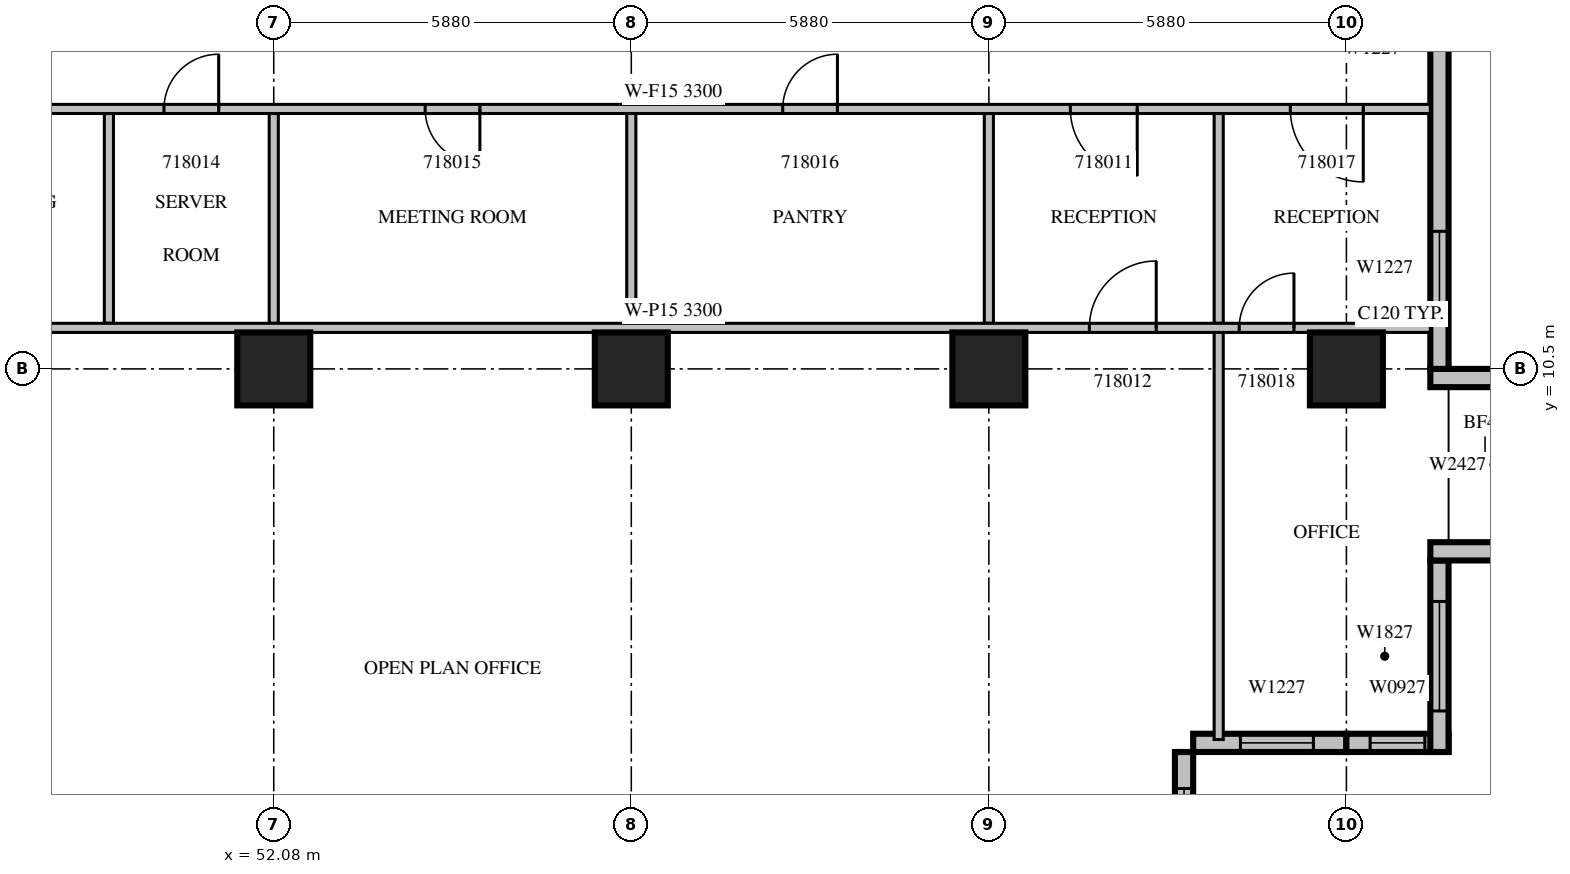
"""IFC4 building model, lengths in metres.
Left out: names, types, materials, properties, quantities, classifications, styles, units other than length and angle.
Written with IfcOpenShell. Run it as: python <this file> out.ifc"""

import sys

from ifc_helpers import new_model, si_unit, direction, frame, frame_2d, origin, origin_2d, place, context, subcontext, project, spatial, rectangle, extrude, source, transform, mapped, element, fill, save


model = new_model("IFC4")
c1 = context("Model", 3, precision=1e-05, world=origin(), true_north=direction((0.0, 1.0)))
c2 = subcontext(c1, "Body", "Model", "MODEL_VIEW")
j1 = project(units=[si_unit("LENGTHUNIT", "METRE"), si_unit("PLANEANGLEUNIT", "RADIAN")], contexts=[c1])
p1 = place(None, origin())
s1 = spatial("IfcSite", under=j1, at=p1, CompositionType="ELEMENT")
p2 = place(p1, origin())
s2 = spatial("IfcBuilding", under=s1, at=p2, CompositionType="ELEMENT")
p3 = place(p2, frame((0.0, 0.0, 86.7)))
s3 = spatial("IfcBuildingStorey", under=s2, at=p3, CompositionType="ELEMENT", Elevation=86.7)
m1 = source(origin(), c2, "Body", "SweptSolid", [
    extrude(rectangle(XDim=1.2, YDim=1.2, at=origin_2d()), origin(), (0.0, 0.0, 1.0), 4.2),
])
for number, where, z_axis, x_axis in (
    (1, (52.08, 10.5, 0.0), (0.0, 0.0, 1.0), (1.0, 0.0, 0.0)),
    (2, (57.96, 10.5, 0.0), (0.0, 0.0, 1.0), (1.0, 0.0, 0.0)),
    (3, (63.84, 10.5, 0.0), (0.0, 0.0, 1.0), (1.0, 0.0, 0.0)),
    (4, (69.72, 10.5, 0.0), (0.0, 0.0, 1.0), (1.0, 0.0, 0.0)),
):
    element("IfcColumn", number, at=place(p3, frame(where, z_axis=z_axis, x_axis=x_axis)), inside=s3, PredefinedType="COLUMN", context=c2, shape_type="MappedRepresentation", body=[
        mapped(m1, transform((0.0, 0.0, 0.0), scale=1.0)),
    ])
m2 = source(origin(), c2, "Body", "SweptSolid", [
    extrude(rectangle(XDim=4.2, YDim=0.3, at=frame_2d((2.1, 0.0))), origin(), (0.0, 0.0, 1.0), 3.8),
])
p4 = place(p3, frame((67.05, 0.0, 0.0), z_axis=(0.0, 0.0, 1.0), x_axis=(0.0, 1.0, 0.0)))
e5 = element("IfcWall", 5, at=p4, inside=s3, PredefinedType="STANDARD", context=c2, shape_type="MappedRepresentation", body=[
    mapped(m2, transform((0.0, 0.0, 0.0), scale=1.0)),
])
m3 = source(origin(), c2, "Body", "SweptSolid", [
    extrude(rectangle(XDim=3.0, YDim=2.7, at=frame_2d((1.5, 1.35))), frame((0.0, 0.16, 0.0), z_axis=(0.0, -1.0, 0.0), x_axis=(1.0, 0.0, 0.0)), (0.0, 0.0, 1.0), 0.32),
])
p5 = place(p4, frame((0.6, 0.0, 0.6)))
e6 = element("IfcOpeningElement", 6, at=p5, cuts=e5, PredefinedType="OPENING", context=c2, shape_type="MappedRepresentation", body=[
    mapped(m3, transform((0.0, 0.0, 0.0), scale=1.0)),
])
m4 = source(origin(), c2, "Body", "SweptSolid", [
    extrude(rectangle(XDim=2.52, YDim=0.3, at=frame_2d((1.26, 0.0))), origin(), (0.0, 0.0, 1.0), 3.8),
])
p6 = place(p3, frame((67.2, 4.35, 0.0), z_axis=(0.0, 0.0, 1.0), x_axis=(1.0, 0.0, 0.0)))
e7 = element("IfcWall", 7, at=p6, inside=s3, PredefinedType="STANDARD", context=c2, shape_type="MappedRepresentation", body=[
    mapped(m4, transform((0.0, 0.0, 0.0), scale=1.0)),
])
m5 = source(origin(), c2, "Body", "SweptSolid", [
    extrude(rectangle(XDim=1.2, YDim=2.7, at=frame_2d((0.6, 1.35))), frame((0.0, 0.16, 0.0), z_axis=(0.0, -1.0, 0.0), x_axis=(1.0, 0.0, 0.0)), (0.0, 0.0, 1.0), 0.32),
])
p7 = place(p6, frame((0.777, 0.0, 0.6)))
e8 = element("IfcOpeningElement", 8, at=p7, cuts=e7, PredefinedType="OPENING", context=c2, shape_type="MappedRepresentation", body=[
    mapped(m5, transform((0.0, 0.0, 0.0), scale=1.0)),
])
m6 = source(origin(), c2, "Body", "SweptSolid", [
    extrude(rectangle(XDim=1.68, YDim=0.3, at=frame_2d((0.84, 0.0))), origin(), (0.0, 0.0, 1.0), 3.8),
])
p8 = place(p3, frame((69.72, 4.35, 0.0), z_axis=(0.0, 0.0, 1.0), x_axis=(1.0, 0.0, 0.0)))
e9 = element("IfcWall", 9, at=p8, inside=s3, PredefinedType="STANDARD", context=c2, shape_type="MappedRepresentation", body=[
    mapped(m6, transform((0.0, 0.0, 0.0), scale=1.0)),
])
m7 = source(origin(), c2, "Body", "SweptSolid", [
    extrude(rectangle(XDim=0.9, YDim=2.7, at=frame_2d((0.45, 1.35))), frame((0.0, 0.16, 0.0), z_axis=(0.0, -1.0, 0.0), x_axis=(1.0, 0.0, 0.0)), (0.0, 0.0, 1.0), 0.32),
])
p9 = place(p8, frame((0.39, 0.0, 0.6)))
e10 = element("IfcOpeningElement", 10, at=p9, cuts=e9, PredefinedType="OPENING", context=c2, shape_type="MappedRepresentation", body=[
    mapped(m7, transform((0.0, 0.0, 0.0), scale=1.0)),
])
m8 = source(origin(), c2, "Body", "SweptSolid", [
    extrude(rectangle(XDim=3.15, YDim=0.3, at=frame_2d((1.575, 0.0))), origin(), (0.0, 0.0, 1.0), 3.8),
])
p10 = place(p3, frame((71.25, 4.2, 0.0), z_axis=(0.0, 0.0, 1.0), x_axis=(0.0, 1.0, 0.0)))
e11 = element("IfcWall", 11, at=p10, inside=s3, PredefinedType="STANDARD", context=c2, shape_type="MappedRepresentation", body=[
    mapped(m8, transform((0.0, 0.0, 0.0), scale=1.0)),
])
m9 = source(origin(), c2, "Body", "SweptSolid", [
    extrude(rectangle(XDim=1.8, YDim=2.7, at=frame_2d((0.9, 1.35))), frame((0.0, 0.16, 0.0), z_axis=(0.0, -1.0, 0.0), x_axis=(1.0, 0.0, 0.0)), (0.0, 0.0, 1.0), 0.32),
])
p11 = place(p10, frame((0.675, 0.0, 0.6)))
e12 = element("IfcOpeningElement", 12, at=p11, cuts=e11, PredefinedType="OPENING", context=c2, shape_type="MappedRepresentation", body=[
    mapped(m9, transform((0.0, 0.0, 0.0), scale=1.0)),
])
m10 = source(origin(), c2, "Body", "SweptSolid", [
    extrude(rectangle(XDim=1.2, YDim=0.3, at=frame_2d((0.6, 0.0))), origin(), (0.0, 0.0, 1.0), 3.8),
])
for number, where, z_axis, x_axis in (
    (13, (71.1, 7.5, 0.0), (0.0, 0.0, 1.0), (1.0, 0.0, 0.0)),
    (14, (71.1, 10.35, 0.0), (0.0, 0.0, 1.0), (1.0, 0.0, 0.0)),
):
    element("IfcWall", number, at=place(p3, frame(where, z_axis=z_axis, x_axis=x_axis)), inside=s3, PredefinedType="STANDARD", context=c2, shape_type="MappedRepresentation", body=[
        mapped(m10, transform((0.0, 0.0, 0.0), scale=1.0)),
    ])
m11 = source(origin(), c2, "Body", "SweptSolid", [
    extrude(rectangle(XDim=6.3, YDim=0.3, at=frame_2d((3.15, 0.0))), origin(), (0.0, 0.0, 1.0), 3.8),
])
p12 = place(p3, frame((71.25, 10.5, 0.0), z_axis=(0.0, 0.0, 1.0), x_axis=(0.0, 1.0, 0.0)))
e15 = element("IfcWall", 15, at=p12, inside=s3, PredefinedType="STANDARD", context=c2, shape_type="MappedRepresentation", body=[
    mapped(m11, transform((0.0, 0.0, 0.0), scale=1.0)),
])
p13 = place(p12, frame((1.062, 0.0, 0.6)))
e16 = element("IfcOpeningElement", 16, at=p13, cuts=e15, PredefinedType="OPENING", context=c2, shape_type="MappedRepresentation", body=[
    mapped(m5, transform((0.0, 0.0, 0.0), scale=1.0)),
])
m12 = source(origin(), c2, "Body", "SweptSolid", [
    extrude(rectangle(XDim=3.45, YDim=0.15, at=frame_2d((1.725, 0.0))), origin(), (0.0, 0.0, 1.0), 3.8),
])
for number, where, z_axis, x_axis in (
    (17, (49.369, 11.25, 0.0), (0.0, 0.0, 1.0), (0.0, 1.0, 0.0)),
    (18, (52.08, 11.25, 0.0), (0.0, 0.0, 1.0), (0.0, 1.0, 0.0)),
    (19, (57.96, 11.25, 0.0), (0.0, 0.0, 1.0), (0.0, 1.0, 0.0)),
    (20, (63.84, 11.25, 0.0), (0.0, 0.0, 1.0), (0.0, 1.0, 0.0)),
):
    element("IfcWall", number, at=place(p3, frame(where, z_axis=z_axis, x_axis=x_axis)), inside=s3, PredefinedType="PARTITIONING", context=c2, shape_type="MappedRepresentation", body=[
        mapped(m12, transform((0.0, 0.0, 0.0), scale=1.0)),
    ])
m13 = source(origin(), c2, "Body", "SweptSolid", [
    extrude(rectangle(XDim=6.695, YDim=0.15, at=frame_2d((3.348, 0.0))), origin(), (0.0, 0.0, 1.0), 3.8),
])
p14 = place(p3, frame((67.62, 4.405, 0.0), z_axis=(0.0, 0.0, 1.0), x_axis=(0.0, 1.0, 0.0)))
e21 = element("IfcWall", 21, at=p14, inside=s3, PredefinedType="PARTITIONING", context=c2, shape_type="MappedRepresentation", body=[
    mapped(m13, transform((0.0, 0.0, 0.0), scale=1.0)),
])
p15 = place(p3, frame((67.62, 11.25, 0.0), z_axis=(0.0, 0.0, 1.0), x_axis=(0.0, 1.0, 0.0)))
e22 = element("IfcWall", 22, at=p15, inside=s3, PredefinedType="PARTITIONING", context=c2, shape_type="MappedRepresentation", body=[
    mapped(m12, transform((0.0, 0.0, 0.0), scale=1.0)),
])
m14 = source(origin(), c2, "Body", "SweptSolid", [
    extrude(rectangle(XDim=24.9, YDim=0.15, at=frame_2d((12.45, 0.0))), origin(), (0.0, 0.0, 1.0), 3.3),
])
p16 = place(p3, frame((71.1, 11.175, 0.0), z_axis=(0.0, 0.0, 1.0), x_axis=(-1.0, 0.0, 0.0)))
e23 = element("IfcWall", 23, at=p16, inside=s3, PredefinedType="PARTITIONING", context=c2, shape_type="MappedRepresentation", body=[
    mapped(m14, transform((0.0, 0.0, 0.0), scale=1.0)),
])
m15 = source(origin(), c2, "Body", "SweptSolid", [
    extrude(rectangle(XDim=1.1, YDim=2.1, at=frame_2d((0.55, 1.05))), frame((0.0, 0.085, 0.0), z_axis=(0.0, -1.0, 0.0), x_axis=(1.0, 0.0, 0.0)), (0.0, 0.0, 1.0), 0.17),
])
p17 = place(p16, frame((4.508, 0.0, 0.0)))
e24 = element("IfcOpeningElement", 24, at=p17, cuts=e23, PredefinedType="OPENING", context=c2, shape_type="MappedRepresentation", body=[
    mapped(m15, transform((0.0, 0.0, 0.0), scale=1.0)),
])
m16 = source(origin(), c2, "Body", "SweptSolid", [
    extrude(rectangle(XDim=0.9, YDim=2.1, at=frame_2d((0.45, 1.05))), frame((0.0, 0.085, 0.0), z_axis=(0.0, -1.0, 0.0), x_axis=(1.0, 0.0, 0.0)), (0.0, 0.0, 1.0), 0.17),
])
p18 = place(p16, frame((2.243, 0.0, 0.0)))
e25 = element("IfcOpeningElement", 25, at=p18, cuts=e23, PredefinedType="OPENING", context=c2, shape_type="MappedRepresentation", body=[
    mapped(m16, transform((0.0, 0.0, 0.0), scale=1.0)),
])
p19 = place(p3, frame((71.1, 14.775, 0.0), z_axis=(0.0, 0.0, 1.0), x_axis=(-1.0, 0.0, 0.0)))
e26 = element("IfcWall", 26, at=p19, inside=s3, PredefinedType="PARTITIONING", context=c2, shape_type="MappedRepresentation", body=[
    mapped(m14, transform((0.0, 0.0, 0.0), scale=1.0)),
])
p20 = place(p19, frame((4.82, 0.0, 0.0)))
e27 = element("IfcOpeningElement", 27, at=p20, cuts=e26, PredefinedType="OPENING", context=c2, shape_type="MappedRepresentation", body=[
    mapped(m15, transform((0.0, 0.0, 0.0), scale=1.0)),
])
p21 = place(p19, frame((22.866, 0.0, 0.0)))
e28 = element("IfcOpeningElement", 28, at=p21, cuts=e26, PredefinedType="OPENING", context=c2, shape_type="MappedRepresentation", body=[
    mapped(m16, transform((0.0, 0.0, 0.0), scale=1.0)),
])
p22 = place(p19, frame((19.925, 0.0, 0.0)))
e29 = element("IfcOpeningElement", 29, at=p22, cuts=e26, PredefinedType="OPENING", context=c2, shape_type="MappedRepresentation", body=[
    mapped(m16, transform((0.0, 0.0, 0.0), scale=1.0)),
])
p23 = place(p19, frame((15.63, 0.0, 0.0)))
e30 = element("IfcOpeningElement", 30, at=p23, cuts=e26, PredefinedType="OPENING", context=c2, shape_type="MappedRepresentation", body=[
    mapped(m16, transform((0.0, 0.0, 0.0), scale=1.0)),
])
p24 = place(p19, frame((9.75, 0.0, 0.0)))
e31 = element("IfcOpeningElement", 31, at=p24, cuts=e26, PredefinedType="OPENING", context=c2, shape_type="MappedRepresentation", body=[
    mapped(m16, transform((0.0, 0.0, 0.0), scale=1.0)),
])
m17 = source(origin(), c2, "Body", "SweptSolid", [
    extrude(rectangle(XDim=1.2, YDim=2.1, at=frame_2d((0.6, 1.05))), frame((0.0, 0.085, 0.0), z_axis=(0.0, -1.0, 0.0), x_axis=(1.0, 0.0, 0.0)), (0.0, 0.0, 1.0), 0.17),
])
p25 = place(p19, frame((1.103, 0.0, 0.0)))
e32 = element("IfcOpeningElement", 32, at=p25, cuts=e26, PredefinedType="OPENING", context=c2, shape_type="MappedRepresentation", body=[
    mapped(m17, transform((0.0, 0.0, 0.0), scale=1.0)),
])
m18 = source(origin(), c2, "Body", "SweptSolid", [
    extrude(rectangle(XDim=3.0, YDim=2.7, at=frame_2d((1.5, 1.35))), frame((0.0, 0.03, 0.0), z_axis=(0.0, -1.0, 0.0), x_axis=(1.0, 0.0, 0.0)), (0.0, 0.0, 1.0), 0.06),
])
p26 = place(p5, origin())
e33 = element("IfcWindow", 33, at=p26, inside=s3, PartitioningType="SINGLE_PANEL", PredefinedType="WINDOW", context=c2, shape_type="MappedRepresentation", body=[
    mapped(m18, transform((0.0, 0.0, 0.0), scale=1.0)),
])
fill(e6, e33)
m19 = source(origin(), c2, "Body", "SweptSolid", [
    extrude(rectangle(XDim=1.2, YDim=2.7, at=frame_2d((0.6, 1.35))), frame((0.0, 0.03, 0.0), z_axis=(0.0, -1.0, 0.0), x_axis=(1.0, 0.0, 0.0)), (0.0, 0.0, 1.0), 0.06),
])
p27 = place(p7, origin())
e34 = element("IfcWindow", 34, at=p27, inside=s3, PartitioningType="SINGLE_PANEL", PredefinedType="WINDOW", context=c2, shape_type="MappedRepresentation", body=[
    mapped(m19, transform((0.0, 0.0, 0.0), scale=1.0)),
])
fill(e8, e34)
m20 = source(origin(), c2, "Body", "SweptSolid", [
    extrude(rectangle(XDim=0.9, YDim=2.7, at=frame_2d((0.45, 1.35))), frame((0.0, 0.03, 0.0), z_axis=(0.0, -1.0, 0.0), x_axis=(1.0, 0.0, 0.0)), (0.0, 0.0, 1.0), 0.06),
])
p28 = place(p9, origin())
e35 = element("IfcWindow", 35, at=p28, inside=s3, PartitioningType="SINGLE_PANEL", PredefinedType="WINDOW", context=c2, shape_type="MappedRepresentation", body=[
    mapped(m20, transform((0.0, 0.0, 0.0), scale=1.0)),
])
fill(e10, e35)
m21 = source(origin(), c2, "Body", "SweptSolid", [
    extrude(rectangle(XDim=1.8, YDim=2.7, at=frame_2d((0.9, 1.35))), frame((0.0, 0.03, 0.0), z_axis=(0.0, -1.0, 0.0), x_axis=(1.0, 0.0, 0.0)), (0.0, 0.0, 1.0), 0.06),
])
p29 = place(p11, origin())
e36 = element("IfcWindow", 36, at=p29, inside=s3, PartitioningType="SINGLE_PANEL", PredefinedType="WINDOW", context=c2, shape_type="MappedRepresentation", body=[
    mapped(m21, transform((0.0, 0.0, 0.0), scale=1.0)),
])
fill(e12, e36)
p30 = place(p13, origin())
e37 = element("IfcWindow", 37, at=p30, inside=s3, PartitioningType="SINGLE_PANEL", PredefinedType="WINDOW", context=c2, shape_type="MappedRepresentation", body=[
    mapped(m19, transform((0.0, 0.0, 0.0), scale=1.0)),
])
fill(e16, e37)
m22 = source(origin(), c2, "Body", "SweptSolid", [
    extrude(rectangle(XDim=1.1, YDim=2.1, at=frame_2d((0.55, 1.05))), frame((0.0, 0.025, 0.0), z_axis=(0.0, -1.0, 0.0), x_axis=(1.0, 0.0, 0.0)), (0.0, 0.0, 1.0), 0.05),
])
p31 = place(p20, origin())
e38 = element("IfcDoor", 38, at=p31, inside=s3, OperationType="SINGLE_SWING_LEFT", PredefinedType="DOOR", context=c2, shape_type="MappedRepresentation", body=[
    mapped(m22, transform((0.0, 0.0, 0.0), scale=1.0)),
])
fill(e27, e38)
p32 = place(p17, origin())
e39 = element("IfcDoor", 39, at=p32, inside=s3, OperationType="SINGLE_SWING_RIGHT", PredefinedType="DOOR", context=c2, shape_type="MappedRepresentation", body=[
    mapped(m22, transform((0.0, 0.0, 0.0), scale=1.0)),
])
fill(e24, e39)
m23 = source(origin(), c2, "Body", "SweptSolid", [
    extrude(rectangle(XDim=0.9, YDim=2.1, at=frame_2d((0.45, 1.05))), frame((0.0, 0.025, 0.0), z_axis=(0.0, -1.0, 0.0), x_axis=(1.0, 0.0, 0.0)), (0.0, 0.0, 1.0), 0.05),
])
p33 = place(p22, origin())
e40 = element("IfcDoor", 40, at=p33, inside=s3, OperationType="SINGLE_SWING_RIGHT", PredefinedType="DOOR", context=c2, shape_type="MappedRepresentation", body=[
    mapped(m23, transform((0.0, 0.0, 0.0), scale=1.0)),
])
fill(e29, e40)
p34 = place(p23, origin())
e41 = element("IfcDoor", 41, at=p34, inside=s3, OperationType="SINGLE_SWING_LEFT", PredefinedType="DOOR", context=c2, shape_type="MappedRepresentation", body=[
    mapped(m23, transform((0.0, 0.0, 0.0), scale=1.0)),
])
fill(e30, e41)
p35 = place(p24, origin())
e42 = element("IfcDoor", 42, at=p35, inside=s3, OperationType="SINGLE_SWING_RIGHT", PredefinedType="DOOR", context=c2, shape_type="MappedRepresentation", body=[
    mapped(m23, transform((0.0, 0.0, 0.0), scale=1.0)),
])
fill(e31, e42)
m24 = source(origin(), c2, "Body", "SweptSolid", [
    extrude(rectangle(XDim=1.2, YDim=2.1, at=frame_2d((0.6, 1.05))), frame((0.0, 0.025, 0.0), z_axis=(0.0, -1.0, 0.0), x_axis=(1.0, 0.0, 0.0)), (0.0, 0.0, 1.0), 0.05),
])
p36 = place(p25, origin())
e43 = element("IfcDoor", 43, at=p36, inside=s3, OperationType="SINGLE_SWING_LEFT", PredefinedType="DOOR", context=c2, shape_type="MappedRepresentation", body=[
    mapped(m24, transform((0.0, 0.0, 0.0), scale=1.0)),
])
fill(e32, e43)
p37 = place(p18, origin())
e44 = element("IfcDoor", 44, at=p37, inside=s3, OperationType="SINGLE_SWING_RIGHT", PredefinedType="DOOR", context=c2, shape_type="MappedRepresentation", body=[
    mapped(m23, transform((0.0, 0.0, 0.0), scale=1.0)),
])
fill(e25, e44)
save(model, sys.argv[1])
